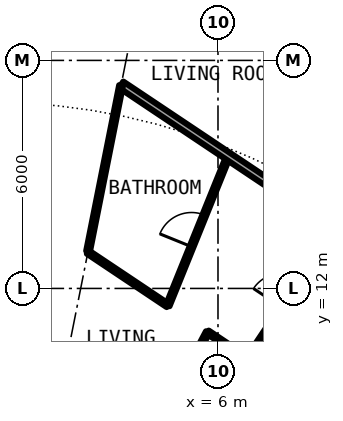
"""IFC4 building model, lengths in metres.
Left out: names, types, materials, properties, quantities, classifications, styles, units other than length and angle.
Written with IfcOpenShell. Run it as: python <this file> out.ifc"""

import sys

from ifc_helpers import new_model, si_unit, direction, frame, frame_2d, origin, place, context, subcontext, project, spatial, rectangle, extrude, element, fill, save


model = new_model("IFC4")
c1 = context("Model", 3, precision=1e-05, world=origin(), true_north=direction((0.0, 1.0)))
c2 = subcontext(c1, "Body", "Model", "MODEL_VIEW")
j1 = project(units=[si_unit("LENGTHUNIT", "METRE"), si_unit("PLANEANGLEUNIT", "RADIAN")], contexts=[c1])
p1 = place(None, origin())
s1 = spatial("IfcSite", under=j1, at=p1, CompositionType="ELEMENT")
p2 = place(p1, origin())
s2 = spatial("IfcBuilding", under=s1, at=p2, CompositionType="ELEMENT")
p3 = place(p2, frame((0.0, 0.0, 218.8)))
s3 = spatial("IfcBuildingStorey", under=s2, at=p3, CompositionType="ELEMENT", Elevation=218.8)
p4 = place(p3, frame((3.605, 6.827, 0.0), z_axis=(0.0, 0.0, 1.0), x_axis=(0.466962677975, 0.884277025246, 0.0)))
e1 = element("IfcWall", 1, at=p4, inside=s3, PredefinedType="PARTITIONING", context=c2, shape_type="SweptSolid", body=[
    extrude(rectangle(XDim=4.549, YDim=0.1, at=frame_2d((2.274, 0.0))), origin(), (0.0, 0.0, 1.0), 2.65),
])
p5 = place(p4, frame((1.824, 0.0, 0.0)))
e2 = element("IfcOpeningElement", 2, at=p5, cuts=e1, PredefinedType="OPENING", context=c2, shape_type="SweptSolid", body=[
    extrude(rectangle(XDim=0.9, YDim=2.3, at=frame_2d((0.45, 1.15))), frame((0.0, 0.06, 0.0), z_axis=(0.0, -1.0, 0.0), x_axis=(1.0, 0.0, 0.0)), (0.0, 0.0, 1.0), 0.12),
])
p6 = place(p3, frame((4.678, 11.551, 0.0), z_axis=(0.0, 0.0, 1.0), x_axis=(0.375509828455, 0.926818411952, 0.0)))
e3 = element("IfcWall", 3, at=p6, inside=s3, PredefinedType="PARTITIONING", context=c2, shape_type="SweptSolid", body=[
    extrude(rectangle(XDim=4.237, YDim=0.1, at=frame_2d((2.119, 0.0))), origin(), (0.0, 0.0, 1.0), 2.65),
])
p7 = place(p6, frame((1.669, 0.0, 0.0)))
e4 = element("IfcOpeningElement", 4, at=p7, cuts=e3, PredefinedType="OPENING", context=c2, shape_type="SweptSolid", body=[
    extrude(rectangle(XDim=0.9, YDim=2.3, at=frame_2d((0.45, 1.15))), frame((0.0, 0.06, 0.0), z_axis=(0.0, -1.0, 0.0), x_axis=(1.0, 0.0, 0.0)), (0.0, 0.0, 1.0), 0.12),
])
p8 = place(p3, frame((6.78, 10.147, 0.0), z_axis=(0.0, 0.0, 1.0), x_axis=(0.555528237031, 0.831497671591, 0.0)))
e5 = element("IfcWall", 5, at=p8, inside=s3, PredefinedType="PARTITIONING", context=c2, shape_type="SweptSolid", body=[
    extrude(rectangle(XDim=4.149, YDim=0.1, at=frame_2d((2.075, 0.0))), origin(), (0.0, 0.0, 1.0), 2.65),
])
p9 = place(p8, frame((1.625, 0.0, 0.0)))
e6 = element("IfcOpeningElement", 6, at=p9, cuts=e5, PredefinedType="OPENING", context=c2, shape_type="SweptSolid", body=[
    extrude(rectangle(XDim=0.9, YDim=2.3, at=frame_2d((0.45, 1.15))), frame((0.0, 0.06, 0.0), z_axis=(0.0, -1.0, 0.0), x_axis=(1.0, 0.0, 0.0)), (0.0, 0.0, 1.0), 0.12),
])
p10 = place(p3, frame((2.577, 12.955, 0.0), z_axis=(0.0, 0.0, 1.0), x_axis=(0.831440395268, -0.555613956912, 0.0)))
e7 = element("IfcWall", 7, at=p10, inside=s3, PredefinedType="PARTITIONING", context=c2, shape_type="SweptSolid", body=[
    extrude(rectangle(XDim=2.527, YDim=0.1, at=frame_2d((1.264, 0.0))), origin(), (0.0, 0.0, 1.0), 2.65),
])
p11 = place(p3, frame((5.729, 10.849, 0.0), z_axis=(0.0, 0.0, 1.0), x_axis=(0.83129689803, -0.555828631257, 0.0)))
e8 = element("IfcWall", 8, at=p11, inside=s3, PredefinedType="PARTITIONING", context=c2, shape_type="SweptSolid", body=[
    extrude(rectangle(XDim=3.394, YDim=0.1, at=frame_2d((1.697, 0.0))), origin(), (0.0, 0.0, 1.0), 2.65),
])
p12 = place(p3, frame((3.453, 17.36, 0.0), z_axis=(0.0, 0.0, 1.0), x_axis=(0.831437137577, -0.555618831806, 0.0)))
e9 = element("IfcWall", 9, at=p12, inside=s3, PredefinedType="PARTITIONING", context=c2, shape_type="SweptSolid", body=[
    extrude(rectangle(XDim=13.549, YDim=0.2, at=frame_2d((6.774, 0.0))), origin(), (0.0, 0.0, 1.0), 2.65),
])
p13 = place(p12, frame((4.581, 0.0, 0.0)))
e10 = element("IfcOpeningElement", 10, at=p13, cuts=e9, PredefinedType="OPENING", context=c2, shape_type="SweptSolid", body=[
    extrude(rectangle(XDim=1.0, YDim=2.3, at=frame_2d((0.5, 1.15))), frame((0.0, 0.11, 0.0), z_axis=(0.0, -1.0, 0.0), x_axis=(1.0, 0.0, 0.0)), (0.0, 0.0, 1.0), 0.22),
])
p14 = place(p3, frame((2.581, 12.976, 0.0), z_axis=(0.0, 0.0, 1.0), x_axis=(0.195102838171, 0.980782790702, 0.0)))
e11 = element("IfcWall", 11, at=p14, inside=s3, PredefinedType="PARTITIONING", context=c2, shape_type="SweptSolid", body=[
    extrude(rectangle(XDim=4.448, YDim=0.1, at=frame_2d((2.224, 0.0))), origin(), (0.0, 0.0, 1.0), 2.65),
])
p15 = place(p7, origin())
e12 = element("IfcDoor", 12, at=p15, inside=s3, OperationType="SINGLE_SWING_RIGHT", PredefinedType="DOOR", context=c2, shape_type="SweptSolid", body=[
    extrude(rectangle(XDim=0.9, YDim=2.3, at=frame_2d((0.45, 1.15))), frame((0.0, 0.025, 0.0), z_axis=(0.0, -1.0, 0.0), x_axis=(1.0, 0.0, 0.0)), (0.0, 0.0, 1.0), 0.05),
])
fill(e4, e12)
save(model, sys.argv[1])
